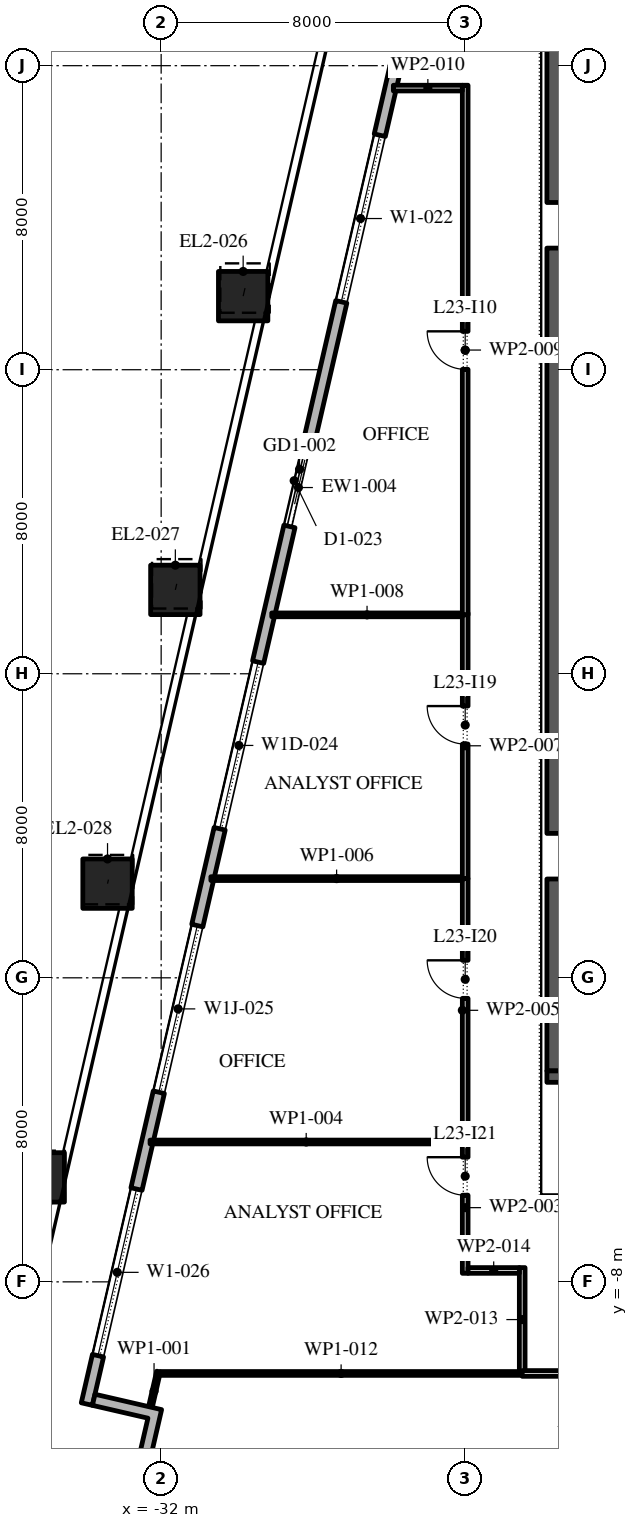
"""IFC4 building model, lengths in metres.
Left out: names, types, materials, properties, quantities, classifications, styles, units other than length and angle.
Written with IfcOpenShell. Run it as: python <this file> out.ifc"""

import sys

from ifc_helpers import new_model, si_unit, direction, frame, frame_2d, origin, origin_2d, place, context, subcontext, project, spatial, polyline, rectangle, outline, extrude, element, fill, save


model = new_model("IFC4")
c1 = context("Model", 3, precision=1e-05, world=origin(), true_north=direction((0.0, 1.0)))
c2 = subcontext(c1, "Body", "Model", "MODEL_VIEW")
j1 = project(units=[si_unit("LENGTHUNIT", "METRE"), si_unit("PLANEANGLEUNIT", "RADIAN")], contexts=[c1])
p1 = place(None, origin())
s1 = spatial("IfcSite", under=j1, at=p1, CompositionType="ELEMENT")
p2 = place(p1, origin())
s2 = spatial("IfcBuilding", under=s1, at=p2, CompositionType="ELEMENT")
p3 = place(p2, frame((0.0, 0.0, 109.8)))
s3 = spatial("IfcBuildingStorey", under=s2, at=p3, CompositionType="ELEMENT", Elevation=109.8)
p4 = place(p3, frame((-29.842, 17.936, 0.0), z_axis=(0.011668267153, 0.050562490995, 0.998652735462), x_axis=(-0.974391195695, 0.224859506699, 0.0)))
e1 = element("IfcColumn", 1, at=p4, inside=s3, PredefinedType="COLUMN", context=c2, shape_type="SweptSolid", body=[
    extrude(rectangle(XDim=1.3, YDim=1.3, at=origin_2d()), origin(), (0.0, 0.0, 1.0), 4.206),
])
p5 = place(p3, frame((-31.627, 10.207, 0.0), z_axis=(0.008770884695, 0.037929719907, 0.99924191662), x_axis=(-0.974290512438, 0.225295355862, 0.0)))
e2 = element("IfcColumn", 2, at=p5, inside=s3, PredefinedType="COLUMN", context=c2, shape_type="SweptSolid", body=[
    extrude(rectangle(XDim=1.3, YDim=1.3, at=origin_2d()), origin(), (0.0, 0.0, 1.0), 4.203),
])
p6 = place(p3, frame((-33.411, 2.478, 0.0), z_axis=(0.005810983994, 0.025277780376, 0.999663576552), x_axis=(-0.974579651079, 0.224041299099, 0.0)))
e3 = element("IfcColumn", 3, at=p6, inside=s3, PredefinedType="COLUMN", context=c2, shape_type="SweptSolid", body=[
    extrude(rectangle(XDim=1.3, YDim=1.3, at=origin_2d()), origin(), (0.0, 0.0, 1.0), 4.201),
])
p7 = place(p3, frame((-35.196, -5.251, 0.0), z_axis=(0.002906224189, 0.012671137464, 0.999915494498), x_axis=(-0.974691740237, 0.22355315143, 0.0)))
e4 = element("IfcColumn", 4, at=p7, inside=s3, PredefinedType="COLUMN", context=c2, shape_type="SweptSolid", body=[
    extrude(rectangle(XDim=1.3, YDim=1.3, at=origin_2d()), origin(), (0.0, 0.0, 1.0), 4.2),
])
p8 = place(p3, frame((-22.82, 37.016, 0.0), z_axis=(0.0, 0.0, 1.0), x_axis=(-0.224953880882, -0.974369412223, 0.0)))
e5 = element("IfcWall", 5, at=p8, inside=s3, PredefinedType="STANDARD", context=c2, shape_type="SweptSolid", body=[
    extrude(rectangle(XDim=49.5, YDim=0.3, at=frame_2d((24.75, 0.0))), origin(), (0.0, 0.0, 1.0), 4.0),
])
p9 = place(p8, frame((1.157, 0.0, 0.45)))
e6 = element("IfcOpeningElement", 6, at=p9, cuts=e5, PredefinedType="OPENING", context=c2, shape_type="SweptSolid", body=[
    extrude(rectangle(XDim=4.5, YDim=3.05, at=frame_2d((2.25, 1.525))), frame((0.0, 0.16, 0.0), z_axis=(0.0, -1.0, 0.0), x_axis=(1.0, 0.0, 0.0)), (0.0, 0.0, 1.0), 0.32),
])
p10 = place(p8, frame((8.121, 0.0, 0.45)))
e7 = element("IfcOpeningElement", 7, at=p10, cuts=e5, PredefinedType="OPENING", context=c2, shape_type="SweptSolid", body=[
    extrude(rectangle(XDim=4.5, YDim=3.05, at=frame_2d((2.25, 1.525))), frame((0.0, 0.16, 0.0), z_axis=(0.0, -1.0, 0.0), x_axis=(1.0, 0.0, 0.0)), (0.0, 0.0, 1.0), 0.32),
])
p11 = place(p8, frame((15.236, 0.0, 0.45)))
e8 = element("IfcOpeningElement", 8, at=p11, cuts=e5, PredefinedType="OPENING", context=c2, shape_type="SweptSolid", body=[
    extrude(rectangle(XDim=4.5, YDim=3.05, at=frame_2d((2.25, 1.525))), frame((0.0, 0.16, 0.0), z_axis=(0.0, -1.0, 0.0), x_axis=(1.0, 0.0, 0.0)), (0.0, 0.0, 1.0), 0.32),
])
p12 = place(p8, frame((23.4, 0.0, 0.0)))
e9 = element("IfcOpeningElement", 9, at=p12, cuts=e5, PredefinedType="OPENING", context=c2, shape_type="SweptSolid", body=[
    extrude(rectangle(XDim=2.4, YDim=3.5, at=frame_2d((1.2, 1.75))), frame((0.0, 0.16, 0.0), z_axis=(0.0, -1.0, 0.0), x_axis=(1.0, 0.0, 0.0)), (0.0, 0.0, 1.0), 0.32),
])
p13 = place(p8, frame((29.464, 0.0, 0.45)))
e10 = element("IfcOpeningElement", 10, at=p13, cuts=e5, PredefinedType="OPENING", context=c2, shape_type="SweptSolid", body=[
    extrude(rectangle(XDim=4.5, YDim=2.875, at=frame_2d((2.25, 1.438))), frame((0.0, 0.16, 0.0), z_axis=(0.0, -1.0, 0.0), x_axis=(1.0, 0.0, 0.0)), (0.0, 0.0, 1.0), 0.32),
])
p14 = place(p8, frame((36.579, 0.0, 0.45)))
e11 = element("IfcOpeningElement", 11, at=p14, cuts=e5, PredefinedType="OPENING", context=c2, shape_type="SweptSolid", body=[
    extrude(rectangle(XDim=4.5, YDim=2.675, at=frame_2d((2.25, 1.337))), frame((0.0, 0.16, 0.0), z_axis=(0.0, -1.0, 0.0), x_axis=(1.0, 0.0, 0.0)), (0.0, 0.0, 1.0), 0.32),
])
p15 = place(p8, frame((43.693, 0.0, 0.45)))
e12 = element("IfcOpeningElement", 12, at=p15, cuts=e5, PredefinedType="OPENING", context=c2, shape_type="SweptSolid", body=[
    extrude(rectangle(XDim=4.5, YDim=3.05, at=frame_2d((2.25, 1.525))), frame((0.0, 0.16, 0.0), z_axis=(0.0, -1.0, 0.0), x_axis=(1.0, 0.0, 0.0)), (0.0, 0.0, 1.0), 0.32),
])
p16 = place(p3, origin())
e13 = element("IfcWall", 13, at=p16, inside=s3, PredefinedType="STANDARD", context=c2, shape_type="SweptSolid", body=[
    extrude(outline(polyline([(-32.393, -13.116), (-30.639, -13.521), (-31.111, -15.567), (-31.404, -15.5), (-30.999, -13.746), (-32.753, -13.341), (-32.348, -11.587), (-33.809, -11.25), (-33.742, -10.957), (-31.988, -11.362), (-32.393, -13.116)])), origin(), (0.0, 0.0, 1.0), 4.0),
])
p17 = place(p3, frame((-21.425, -2.45, 0.0), z_axis=(0.0, 0.0, 1.0), x_axis=(0.0, 1.0, 0.0)))
e14 = element("IfcWall", 14, at=p17, inside=s3, PredefinedType="SHEAR", context=c2, shape_type="SweptSolid", body=[
    extrude(rectangle(XDim=27.9, YDim=0.85, at=frame_2d((13.95, 0.0))), origin(), (0.0, 0.0, 1.0), 4.0),
])
p18 = place(p17, frame((5.05, 0.0, 0.0)))
e15 = element("IfcOpeningElement", 15, at=p18, cuts=e14, PredefinedType="OPENING", context=c2, shape_type="SweptSolid", body=[
    extrude(rectangle(XDim=1.2, YDim=2.1, at=frame_2d((0.6, 1.05))), frame((0.0, 0.435, 0.0), z_axis=(0.0, -1.0, 0.0), x_axis=(1.0, 0.0, 0.0)), (0.0, 0.0, 1.0), 0.87),
])
p19 = place(p17, frame((21.65, 0.0, 0.0)))
e16 = element("IfcOpeningElement", 16, at=p19, cuts=e14, PredefinedType="OPENING", context=c2, shape_type="SweptSolid", body=[
    extrude(rectangle(XDim=1.2, YDim=2.1, at=frame_2d((0.6, 1.05))), frame((0.0, 0.435, 0.0), z_axis=(0.0, -1.0, 0.0), x_axis=(1.0, 0.0, 0.0)), (0.0, 0.0, 1.0), 0.87),
])
p20 = place(p3, frame((-21.85, -2.6, 0.0), z_axis=(0.0, 0.0, 1.0), x_axis=(1.0, 0.0, 0.0)))
e17 = element("IfcWall", 17, at=p20, inside=s3, PredefinedType="SHEAR", context=c2, shape_type="SweptSolid", body=[
    extrude(rectangle(XDim=11.7, YDim=0.3, at=frame_2d((5.85, 0.0))), origin(), (0.0, 0.0, 1.0), 4.0),
])
p21 = place(p3, frame((-32.069, -10.361, 0.0), z_axis=(0.0, 0.0, 1.0), x_axis=(-0.222987762652, -0.974821243976, 0.0)))
e18 = element("IfcWall", 18, at=p21, inside=s3, PredefinedType="PARTITIONING", context=c2, shape_type="SweptSolid", body=[
    extrude(rectangle(XDim=1.058, YDim=0.1, at=frame_2d((0.529, 0.0))), origin(), (0.0, 0.0, 1.0), 4.0),
])
p22 = place(p3, frame((-24.0, -7.775, 0.0), z_axis=(0.0, 0.0, 1.0), x_axis=(0.0, 1.0, 0.0)))
e19 = element("IfcWall", 19, at=p22, inside=s3, PredefinedType="PARTITIONING", context=c2, shape_type="SweptSolid", body=[
    extrude(rectangle(XDim=3.455, YDim=0.15, at=frame_2d((1.728, 0.0))), origin(), (0.0, 0.0, 1.0), 4.0),
])
p23 = place(p22, frame((2.055, 0.0, 0.0)))
e20 = element("IfcOpeningElement", 20, at=p23, cuts=e19, PredefinedType="OPENING", context=c2, shape_type="SweptSolid", body=[
    extrude(rectangle(XDim=1.0, YDim=2.1, at=frame_2d((0.5, 1.05))), frame((0.0, 0.085, 0.0), z_axis=(0.0, -1.0, 0.0), x_axis=(1.0, 0.0, 0.0)), (0.0, 0.0, 1.0), 0.17),
])
p24 = place(p3, frame((-24.075, -4.32, 0.0), z_axis=(0.0, 0.0, 1.0), x_axis=(-1.0, 0.0, 0.0)))
e21 = element("IfcWall", 21, at=p24, inside=s3, PredefinedType="PARTITIONING", context=c2, shape_type="SweptSolid", body=[
    extrude(rectangle(XDim=8.217, YDim=0.1, at=frame_2d((4.108, 0.0))), origin(), (0.0, 0.0, 1.0), 4.0),
])
p25 = place(p3, frame((-24.0, -4.32, 0.0), z_axis=(0.0, 0.0, 1.0), x_axis=(0.0, 1.0, 0.0)))
e22 = element("IfcWall", 22, at=p25, inside=s3, PredefinedType="PARTITIONING", context=c2, shape_type="SweptSolid", body=[
    extrude(rectangle(XDim=6.93, YDim=0.15, at=frame_2d((3.465, 0.0))), origin(), (0.0, 0.0, 1.0), 4.0),
])
p26 = place(p25, frame((3.78, 0.0, 0.0)))
e23 = element("IfcOpeningElement", 23, at=p26, cuts=e22, PredefinedType="OPENING", context=c2, shape_type="SweptSolid", body=[
    extrude(rectangle(XDim=1.0, YDim=2.1, at=frame_2d((0.5, 1.05))), frame((0.0, 0.085, 0.0), z_axis=(0.0, -1.0, 0.0), x_axis=(1.0, 0.0, 0.0)), (0.0, 0.0, 1.0), 0.17),
])
p27 = place(p3, frame((-24.075, 2.61, 0.0), z_axis=(0.0, 0.0, 1.0), x_axis=(-1.0, 0.0, 0.0)))
e24 = element("IfcWall", 24, at=p27, inside=s3, PredefinedType="PARTITIONING", context=c2, shape_type="SweptSolid", body=[
    extrude(rectangle(XDim=6.617, YDim=0.1, at=frame_2d((3.309, 0.0))), origin(), (0.0, 0.0, 1.0), 4.0),
])
p28 = place(p3, frame((-24.0, 2.61, 0.0), z_axis=(0.0, 0.0, 1.0), x_axis=(0.0, 1.0, 0.0)))
e25 = element("IfcWall", 25, at=p28, inside=s3, PredefinedType="PARTITIONING", context=c2, shape_type="SweptSolid", body=[
    extrude(rectangle(XDim=6.99, YDim=0.15, at=frame_2d((3.495, 0.0))), origin(), (0.0, 0.0, 1.0), 4.0),
])
p29 = place(p28, frame((3.54, 0.0, 0.0)))
e26 = element("IfcOpeningElement", 26, at=p29, cuts=e25, PredefinedType="OPENING", context=c2, shape_type="SweptSolid", body=[
    extrude(rectangle(XDim=1.0, YDim=2.1, at=frame_2d((0.5, 1.05))), frame((0.0, 0.085, 0.0), z_axis=(0.0, -1.0, 0.0), x_axis=(1.0, 0.0, 0.0)), (0.0, 0.0, 1.0), 0.17),
])
p30 = place(p3, frame((-24.075, 9.55, 0.0), z_axis=(0.0, 0.0, 1.0), x_axis=(-1.0, 0.0, 0.0)))
e27 = element("IfcWall", 27, at=p30, inside=s3, PredefinedType="PARTITIONING", context=c2, shape_type="SweptSolid", body=[
    extrude(rectangle(XDim=5.015, YDim=0.1, at=frame_2d((2.508, 0.0))), origin(), (0.0, 0.0, 1.0), 4.0),
])
p31 = place(p3, frame((-24.0, 9.55, 0.0), z_axis=(0.0, 0.0, 1.0), x_axis=(0.0, 1.0, 0.0)))
e28 = element("IfcWall", 28, at=p31, inside=s3, PredefinedType="PARTITIONING", context=c2, shape_type="SweptSolid", body=[
    extrude(rectangle(XDim=13.935, YDim=0.15, at=frame_2d((6.968, 0.0))), origin(), (0.0, 0.0, 1.0), 4.0),
])
p32 = place(p31, frame((6.46, 0.0, 0.0)))
e29 = element("IfcOpeningElement", 29, at=p32, cuts=e28, PredefinedType="OPENING", context=c2, shape_type="SweptSolid", body=[
    extrude(rectangle(XDim=1.0, YDim=2.1, at=frame_2d((0.5, 1.05))), frame((0.0, 0.085, 0.0), z_axis=(0.0, -1.0, 0.0), x_axis=(1.0, 0.0, 0.0)), (0.0, 0.0, 1.0), 0.17),
])
p33 = place(p3, frame((-24.075, 23.41, 0.0), z_axis=(0.0, 0.0, 1.0), x_axis=(-1.0, 0.0, 0.0)))
e30 = element("IfcWall", 30, at=p33, inside=s3, PredefinedType="PARTITIONING", context=c2, shape_type="SweptSolid", body=[
    extrude(rectangle(XDim=1.815, YDim=0.15, at=frame_2d((0.907, 0.0))), origin(), (0.0, 0.0, 1.0), 4.0),
])
p34 = place(p3, frame((-22.5, -10.41, 0.0), z_axis=(0.0, 0.0, 1.0), x_axis=(-1.0, 0.0, 0.0)))
e31 = element("IfcWall", 31, at=p34, inside=s3, PredefinedType="PARTITIONING", context=c2, shape_type="SweptSolid", body=[
    extrude(rectangle(XDim=9.53, YDim=0.1, at=frame_2d((4.765, 0.0))), origin(), (0.0, 0.0, 1.0), 4.0),
])
p35 = place(p3, frame((-22.5, -10.36, 0.0), z_axis=(0.0, 0.0, 1.0), x_axis=(0.0, 1.0, 0.0)))
e32 = element("IfcWall", 32, at=p35, inside=s3, PredefinedType="PARTITIONING", context=c2, shape_type="SweptSolid", body=[
    extrude(rectangle(XDim=2.735, YDim=0.15, at=frame_2d((1.368, 0.0))), origin(), (0.0, 0.0, 1.0), 4.0),
])
p36 = place(p3, frame((-22.575, -7.7, 0.0), z_axis=(0.0, 0.0, 1.0), x_axis=(-1.0, 0.0, 0.0)))
e33 = element("IfcWall", 33, at=p36, inside=s3, PredefinedType="PARTITIONING", context=c2, shape_type="SweptSolid", body=[
    extrude(rectangle(XDim=1.35, YDim=0.15, at=frame_2d((0.675, 0.0))), origin(), (0.0, 0.0, 1.0), 4.0),
])
p37 = place(p3, frame((-18.7, -10.41, 0.0), z_axis=(0.0, 0.0, 1.0), x_axis=(-1.0, 0.0, 0.0)))
e34 = element("IfcWall", 34, at=p37, inside=s3, PredefinedType="PARTITIONING", context=c2, shape_type="SweptSolid", body=[
    extrude(rectangle(XDim=3.8, YDim=0.15, at=frame_2d((1.9, 0.0))), origin(), (0.0, 0.0, 1.0), 4.0),
])
p38 = place(p37, frame((1.4, 0.0, 0.0)))
e35 = element("IfcOpeningElement", 35, at=p38, cuts=e34, PredefinedType="OPENING", context=c2, shape_type="SweptSolid", body=[
    extrude(rectangle(XDim=1.0, YDim=2.1, at=frame_2d((0.5, 1.05))), frame((0.0, 0.085, 0.0), z_axis=(0.0, -1.0, 0.0), x_axis=(1.0, 0.0, 0.0)), (0.0, 0.0, 1.0), 0.17),
])
p39 = place(p11, origin())
e36 = element("IfcWindow", 36, at=p39, inside=s3, PartitioningType="DOUBLE_PANEL_VERTICAL", PredefinedType="WINDOW", context=c2, shape_type="SweptSolid", body=[
    extrude(rectangle(XDim=4.5, YDim=3.05, at=frame_2d((2.25, 1.525))), frame((0.0, 0.03, 0.0), z_axis=(0.0, -1.0, 0.0), x_axis=(1.0, 0.0, 0.0)), (0.0, 0.0, 1.0), 0.06),
])
fill(e8, e36)
p40 = place(p12, origin())
e37 = element("IfcDoor", 37, at=p40, inside=s3, OperationType="DOUBLE_DOOR_SLIDING", PredefinedType="DOOR", context=c2, shape_type="SweptSolid", body=[
    extrude(rectangle(XDim=2.4, YDim=3.5, at=frame_2d((1.2, 1.75))), frame((0.0, 0.025, 0.0), z_axis=(0.0, -1.0, 0.0), x_axis=(1.0, 0.0, 0.0)), (0.0, 0.0, 1.0), 0.05),
])
fill(e9, e37)
p41 = place(p13, origin())
e38 = element("IfcWindow", 38, at=p41, inside=s3, PartitioningType="DOUBLE_PANEL_VERTICAL", PredefinedType="WINDOW", context=c2, shape_type="SweptSolid", body=[
    extrude(rectangle(XDim=4.5, YDim=2.875, at=frame_2d((2.25, 1.438))), frame((0.0, 0.03, 0.0), z_axis=(0.0, -1.0, 0.0), x_axis=(1.0, 0.0, 0.0)), (0.0, 0.0, 1.0), 0.06),
])
fill(e10, e38)
p42 = place(p14, origin())
e39 = element("IfcWindow", 39, at=p42, inside=s3, PartitioningType="DOUBLE_PANEL_VERTICAL", PredefinedType="WINDOW", context=c2, shape_type="SweptSolid", body=[
    extrude(rectangle(XDim=4.5, YDim=2.675, at=frame_2d((2.25, 1.337))), frame((0.0, 0.03, 0.0), z_axis=(0.0, -1.0, 0.0), x_axis=(1.0, 0.0, 0.0)), (0.0, 0.0, 1.0), 0.06),
])
fill(e11, e39)
p43 = place(p15, origin())
e40 = element("IfcWindow", 40, at=p43, inside=s3, PartitioningType="DOUBLE_PANEL_VERTICAL", PredefinedType="WINDOW", context=c2, shape_type="SweptSolid", body=[
    extrude(rectangle(XDim=4.5, YDim=3.05, at=frame_2d((2.25, 1.525))), frame((0.0, 0.03, 0.0), z_axis=(0.0, -1.0, 0.0), x_axis=(1.0, 0.0, 0.0)), (0.0, 0.0, 1.0), 0.06),
])
fill(e12, e40)
p44 = place(p32, origin())
e41 = element("IfcDoor", 41, at=p44, inside=s3, OperationType="SINGLE_SWING_LEFT", PredefinedType="DOOR", context=c2, shape_type="SweptSolid", body=[
    extrude(rectangle(XDim=1.0, YDim=2.1, at=frame_2d((0.5, 1.05))), frame((0.0, 0.025, 0.0), z_axis=(0.0, -1.0, 0.0), x_axis=(1.0, 0.0, 0.0)), (0.0, 0.0, 1.0), 0.05),
])
fill(e29, e41)
p45 = place(p29, origin())
e42 = element("IfcDoor", 42, at=p45, inside=s3, OperationType="SINGLE_SWING_LEFT", PredefinedType="DOOR", context=c2, shape_type="SweptSolid", body=[
    extrude(rectangle(XDim=1.0, YDim=2.1, at=frame_2d((0.5, 1.05))), frame((0.0, 0.025, 0.0), z_axis=(0.0, -1.0, 0.0), x_axis=(1.0, 0.0, 0.0)), (0.0, 0.0, 1.0), 0.05),
])
fill(e26, e42)
p46 = place(p26, origin())
e43 = element("IfcDoor", 43, at=p46, inside=s3, OperationType="SINGLE_SWING_LEFT", PredefinedType="DOOR", context=c2, shape_type="SweptSolid", body=[
    extrude(rectangle(XDim=1.0, YDim=2.1, at=frame_2d((0.5, 1.05))), frame((0.0, 0.025, 0.0), z_axis=(0.0, -1.0, 0.0), x_axis=(1.0, 0.0, 0.0)), (0.0, 0.0, 1.0), 0.05),
])
fill(e23, e43)
p47 = place(p23, origin())
e44 = element("IfcDoor", 44, at=p47, inside=s3, OperationType="SINGLE_SWING_LEFT", PredefinedType="DOOR", context=c2, shape_type="SweptSolid", body=[
    extrude(rectangle(XDim=1.0, YDim=2.1, at=frame_2d((0.5, 1.05))), frame((0.0, 0.025, 0.0), z_axis=(0.0, -1.0, 0.0), x_axis=(1.0, 0.0, 0.0)), (0.0, 0.0, 1.0), 0.05),
])
fill(e20, e44)
save(model, sys.argv[1])
